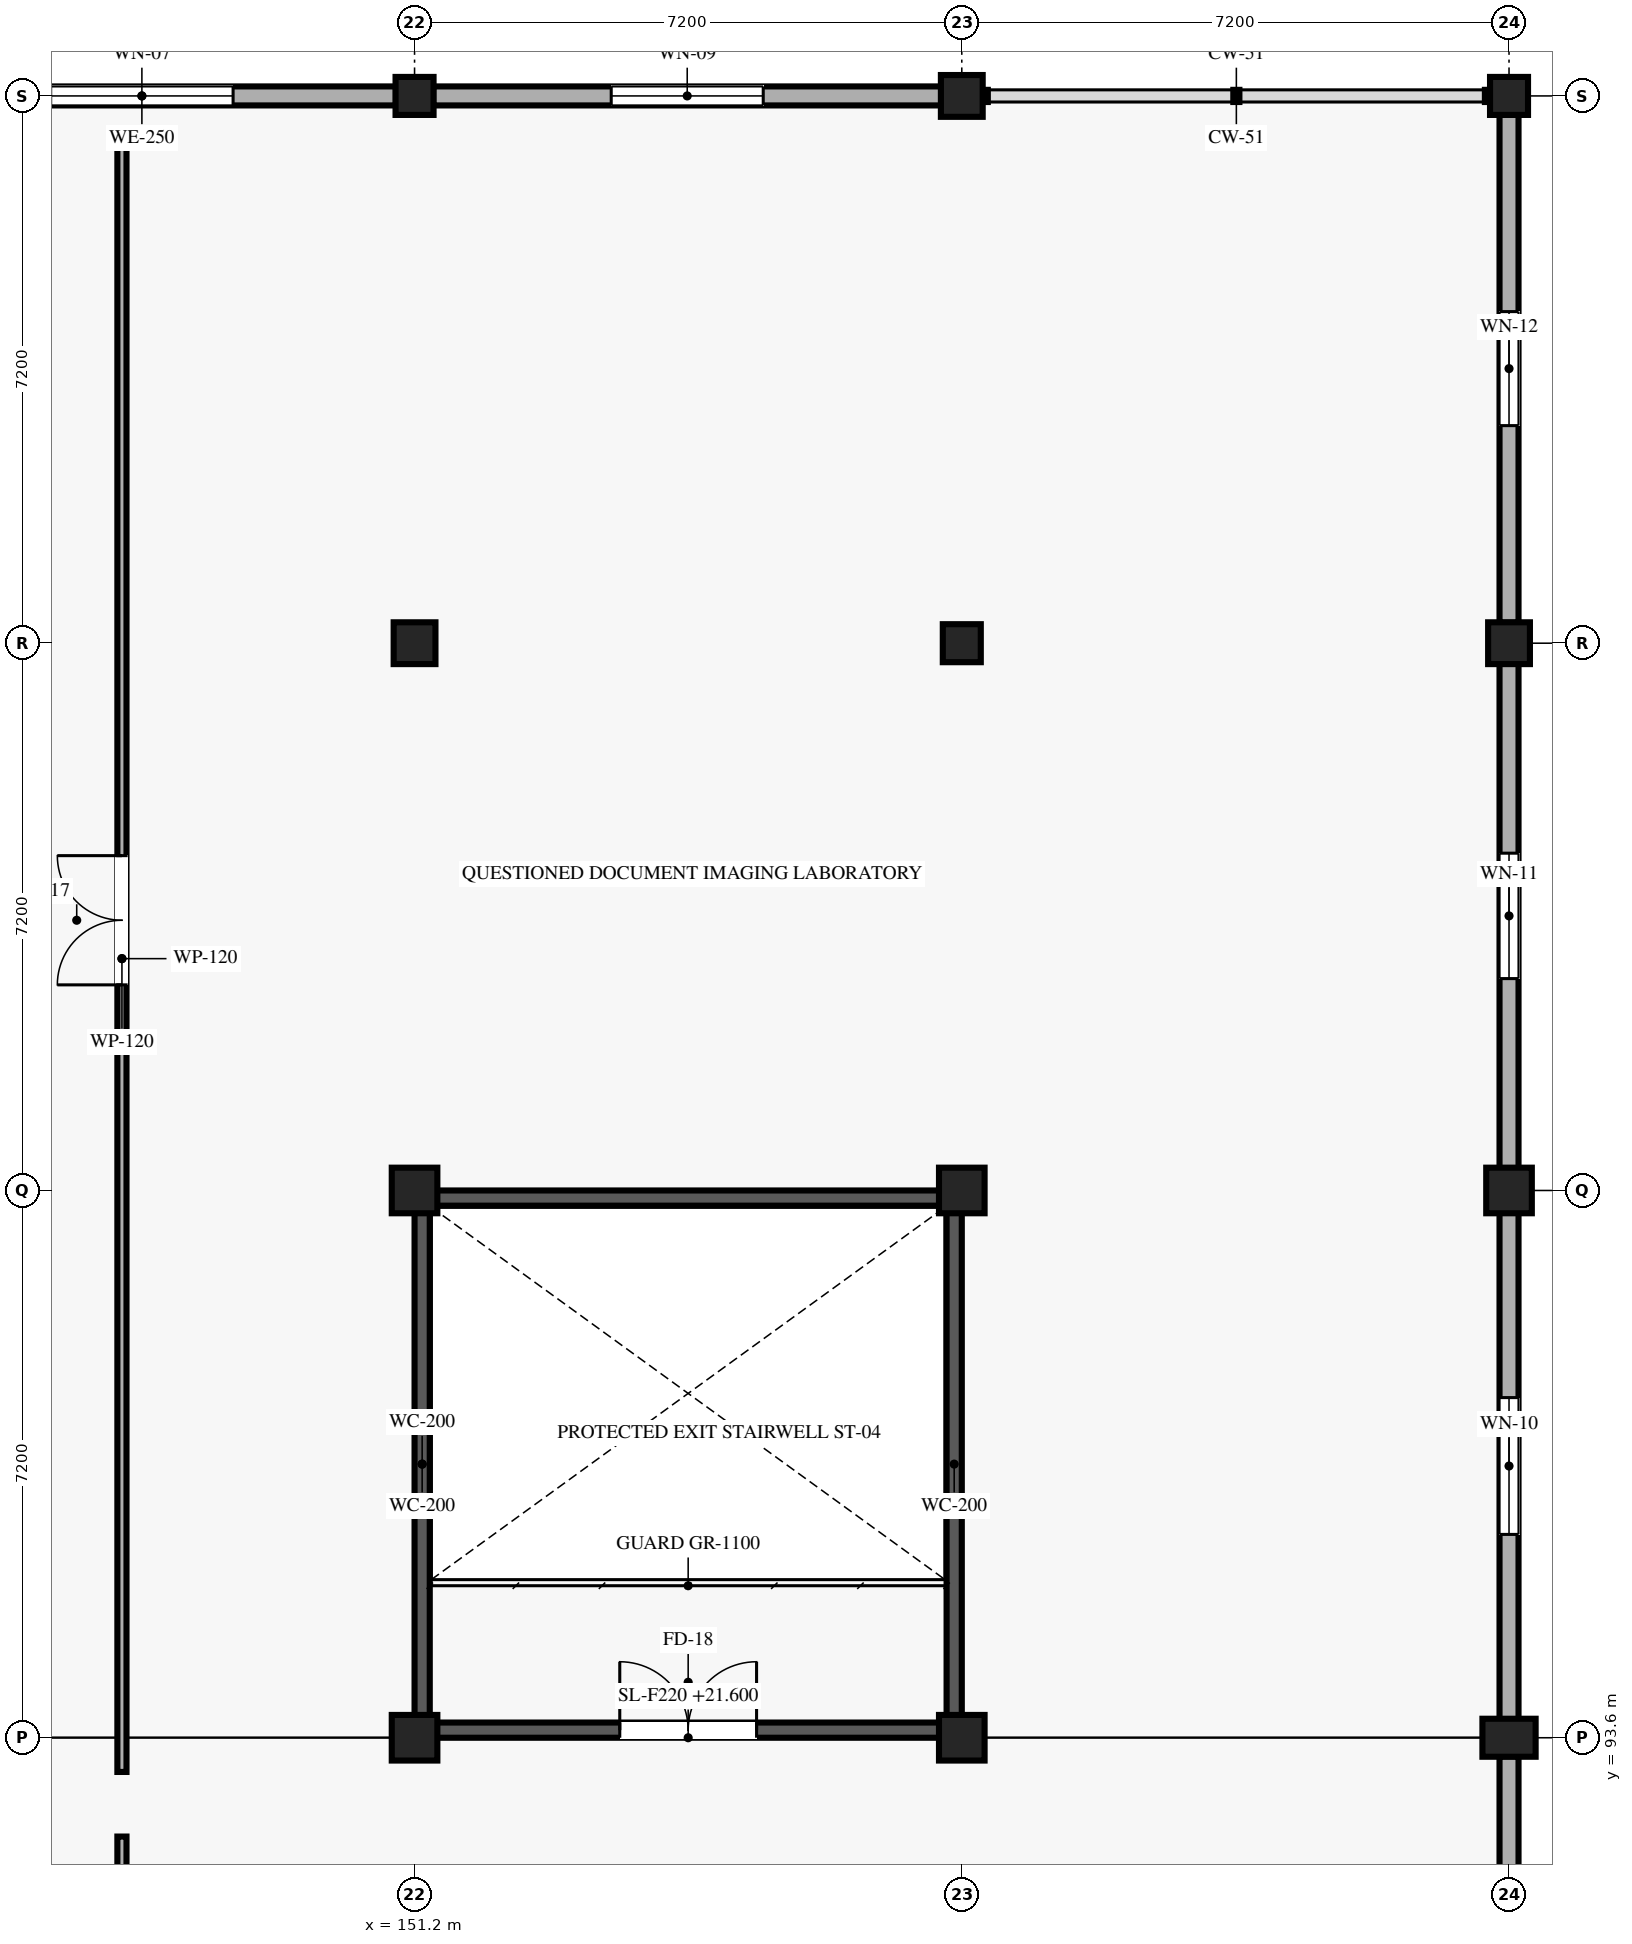
"""IFC4 building model, lengths in metres.
Left out: names, types, materials, properties, quantities, classifications, styles, units other than length and angle.
Written with IfcOpenShell. Run it as: python <this file> out.ifc"""

import sys

from ifc_helpers import new_model, si_unit, direction, frame, frame_2d, origin, origin_2d, place, context, subcontext, project, spatial, rectangle, extrude, element, fill, save


model = new_model("IFC4")
c1 = context("Model", 3, precision=1e-05, world=origin(), true_north=direction((0.0, 1.0)))
c2 = subcontext(c1, "Body", "Model", "MODEL_VIEW")
j1 = project(units=[si_unit("LENGTHUNIT", "METRE"), si_unit("PLANEANGLEUNIT", "RADIAN")], contexts=[c1])
p1 = place(None, origin())
s1 = spatial("IfcSite", under=j1, at=p1, CompositionType="ELEMENT")
p2 = place(p1, origin())
s2 = spatial("IfcBuilding", under=s1, at=p2, CompositionType="ELEMENT")
p3 = place(p2, frame((0.0, 0.0, 21.6)))
s3 = spatial("IfcBuildingStorey", under=s2, at=p3, CompositionType="ELEMENT", Elevation=21.6)
for number, where, z_axis, x_axis in (
    (1, (151.2, 93.6, 0.0), (0.0, 0.0, 1.0), (1.0, 0.0, 0.0)),
    (2, (151.2, 100.8, 0.0), (0.0, 0.0, 1.0), (1.0, 0.0, 0.0)),
):
    element("IfcColumn", number, at=place(p3, frame(where, z_axis=z_axis, x_axis=x_axis)), inside=s3, PredefinedType="COLUMN", context=c2, shape_type="SweptSolid", body=[
        extrude(rectangle(XDim=0.6, YDim=0.6, at=origin_2d()), origin(), (0.0, 0.0, 1.0), 4.05),
    ])
p4 = place(p3, frame((151.2, 108.0, 0.0), z_axis=(0.0, 0.0, 1.0), x_axis=(1.0, 0.0, 0.0)))
e3 = element("IfcColumn", 3, at=p4, inside=s3, PredefinedType="COLUMN", context=c2, shape_type="SweptSolid", body=[
    extrude(rectangle(XDim=0.55, YDim=0.55, at=origin_2d()), origin(), (0.0, 0.0, 1.0), 4.05),
])
p5 = place(p3, frame((151.2, 115.2, 0.0), z_axis=(0.0, 0.0, 1.0), x_axis=(1.0, 0.0, 0.0)))
e4 = element("IfcColumn", 4, at=p5, inside=s3, PredefinedType="COLUMN", context=c2, shape_type="SweptSolid", body=[
    extrude(rectangle(XDim=0.5, YDim=0.5, at=origin_2d()), origin(), (0.0, 0.0, 1.0), 4.05),
])
for number, where, z_axis, x_axis in (
    (5, (158.4, 93.6, 0.0), (0.0, 0.0, 1.0), (1.0, 0.0, 0.0)),
    (6, (158.4, 100.8, 0.0), (0.0, 0.0, 1.0), (1.0, 0.0, 0.0)),
):
    element("IfcColumn", number, at=place(p3, frame(where, z_axis=z_axis, x_axis=x_axis)), inside=s3, PredefinedType="COLUMN", context=c2, shape_type="SweptSolid", body=[
        extrude(rectangle(XDim=0.6, YDim=0.6, at=origin_2d()), origin(), (0.0, 0.0, 1.0), 4.05),
    ])
p6 = place(p3, frame((158.4, 108.0, 0.0), z_axis=(0.0, 0.0, 1.0), x_axis=(1.0, 0.0, 0.0)))
e7 = element("IfcColumn", 7, at=p6, inside=s3, PredefinedType="COLUMN", context=c2, shape_type="SweptSolid", body=[
    extrude(rectangle(XDim=0.5, YDim=0.5, at=origin_2d()), origin(), (0.0, 0.0, 1.0), 4.05),
])
p7 = place(p3, frame((158.4, 115.2, 0.0), z_axis=(0.0, 0.0, 1.0), x_axis=(1.0, 0.0, 0.0)))
e8 = element("IfcColumn", 8, at=p7, inside=s3, PredefinedType="COLUMN", context=c2, shape_type="SweptSolid", body=[
    extrude(rectangle(XDim=0.55, YDim=0.55, at=origin_2d()), origin(), (0.0, 0.0, 1.0), 4.05),
])
p8 = place(p3, frame((165.6, 93.6, 0.0), z_axis=(0.0, 0.0, 1.0), x_axis=(0.0, 1.0, 0.0)))
e9 = element("IfcColumn", 9, at=p8, inside=s3, PredefinedType="COLUMN", context=c2, shape_type="SweptSolid", body=[
    extrude(rectangle(XDim=0.5, YDim=0.7, at=origin_2d()), origin(), (0.0, 0.0, 1.0), 4.05),
])
p9 = place(p3, frame((165.6, 100.8, 0.0), z_axis=(0.0, 0.0, 1.0), x_axis=(1.0, 0.0, 0.0)))
e10 = element("IfcColumn", 10, at=p9, inside=s3, PredefinedType="COLUMN", context=c2, shape_type="SweptSolid", body=[
    extrude(rectangle(XDim=0.6, YDim=0.6, at=origin_2d()), origin(), (0.0, 0.0, 1.0), 4.05),
])
p10 = place(p3, frame((165.6, 108.0, 0.0), z_axis=(0.0, 0.0, 1.0), x_axis=(1.0, 0.0, 0.0)))
e11 = element("IfcColumn", 11, at=p10, inside=s3, PredefinedType="COLUMN", context=c2, shape_type="SweptSolid", body=[
    extrude(rectangle(XDim=0.55, YDim=0.55, at=origin_2d()), origin(), (0.0, 0.0, 1.0), 4.05),
])
p11 = place(p3, frame((165.6, 115.2, 0.0), z_axis=(0.0, 0.0, 1.0), x_axis=(1.0, 0.0, 0.0)))
e12 = element("IfcColumn", 12, at=p11, inside=s3, PredefinedType="COLUMN", context=c2, shape_type="SweptSolid", body=[
    extrude(rectangle(XDim=0.5, YDim=0.5, at=origin_2d()), origin(), (0.0, 0.0, 1.0), 4.05),
])
p12 = place(p3, frame((144.27, 115.2, 0.0), z_axis=(0.0, 0.0, 1.0), x_axis=(1.0, 0.0, 0.0)))
e13 = element("IfcWall", 13, at=p12, inside=s3, PredefinedType="SOLIDWALL", context=c2, shape_type="SweptSolid", body=[
    extrude(rectangle(XDim=6.685, YDim=0.25, at=frame_2d((3.343, 0.0))), origin(), (0.0, 0.0, 1.0), 3.295),
])
p13 = place(p12, frame((2.143, 0.0, 0.85)))
e14 = element("IfcOpeningElement", 14, at=p13, cuts=e13, PredefinedType="OPENING", context=c2, shape_type="SweptSolid", body=[
    extrude(rectangle(XDim=2.4, YDim=1.75, at=frame_2d((1.2, 0.875))), frame((0.0, 0.135, 0.0), z_axis=(0.0, -1.0, 0.0), x_axis=(1.0, 0.0, 0.0)), (0.0, 0.0, 1.0), 0.27),
])
p14 = place(p3, frame((151.445, 115.2, 0.0), z_axis=(0.0, 0.0, 1.0), x_axis=(1.0, 0.0, 0.0)))
e15 = element("IfcWall", 15, at=p14, inside=s3, PredefinedType="SOLIDWALL", context=c2, shape_type="SweptSolid", body=[
    extrude(rectangle(XDim=6.685, YDim=0.25, at=frame_2d((3.342, 0.0))), origin(), (0.0, 0.0, 1.0), 3.295),
])
p15 = place(p14, frame((2.343, 0.0, 0.85)))
e16 = element("IfcOpeningElement", 16, at=p15, cuts=e15, PredefinedType="OPENING", context=c2, shape_type="SweptSolid", body=[
    extrude(rectangle(XDim=2.0, YDim=1.65, at=frame_2d((1.0, 0.825))), frame((0.0, 0.135, 0.0), z_axis=(0.0, -1.0, 0.0), x_axis=(1.0, 0.0, 0.0)), (0.0, 0.0, 1.0), 0.27),
])
p16 = place(p3, frame((165.6, 86.645, 0.0), z_axis=(0.0, 0.0, 1.0), x_axis=(0.0, 1.0, 0.0)))
e17 = element("IfcWall", 17, at=p16, inside=s3, PredefinedType="SOLIDWALL", context=c2, shape_type="SweptSolid", body=[
    extrude(rectangle(XDim=6.71, YDim=0.25, at=frame_2d((3.355, 0.0))), origin(), (0.0, 0.0, 1.0), 3.295),
])
p17 = place(p16, frame((2.355, 0.0, 0.85)))
e18 = element("IfcOpeningElement", 18, at=p17, cuts=e17, PredefinedType="OPENING", context=c2, shape_type="SweptSolid", body=[
    extrude(rectangle(XDim=2.0, YDim=1.65, at=frame_2d((1.0, 0.825))), frame((0.0, 0.135, 0.0), z_axis=(0.0, -1.0, 0.0), x_axis=(1.0, 0.0, 0.0)), (0.0, 0.0, 1.0), 0.27),
])
p18 = place(p3, frame((165.6, 93.845, 0.0), z_axis=(0.0, 0.0, 1.0), x_axis=(0.0, 1.0, 0.0)))
e19 = element("IfcWall", 19, at=p18, inside=s3, PredefinedType="SOLIDWALL", context=c2, shape_type="SweptSolid", body=[
    extrude(rectangle(XDim=6.66, YDim=0.25, at=frame_2d((3.33, 0.0))), origin(), (0.0, 0.0, 1.0), 3.295),
])
p19 = place(p18, frame((2.43, 0.0, 0.85)))
e20 = element("IfcOpeningElement", 20, at=p19, cuts=e19, PredefinedType="OPENING", context=c2, shape_type="SweptSolid", body=[
    extrude(rectangle(XDim=1.8, YDim=1.6, at=frame_2d((0.9, 0.8))), frame((0.0, 0.135, 0.0), z_axis=(0.0, -1.0, 0.0), x_axis=(1.0, 0.0, 0.0)), (0.0, 0.0, 1.0), 0.27),
])
p20 = place(p3, frame((165.6, 101.095, 0.0), z_axis=(0.0, 0.0, 1.0), x_axis=(0.0, 1.0, 0.0)))
e21 = element("IfcWall", 21, at=p20, inside=s3, PredefinedType="SOLIDWALL", context=c2, shape_type="SweptSolid", body=[
    extrude(rectangle(XDim=6.635, YDim=0.25, at=frame_2d((3.317, 0.0))), origin(), (0.0, 0.0, 1.0), 3.295),
])
p21 = place(p20, frame((2.492, 0.0, 0.85)))
e22 = element("IfcOpeningElement", 22, at=p21, cuts=e21, PredefinedType="OPENING", context=c2, shape_type="SweptSolid", body=[
    extrude(rectangle(XDim=1.65, YDim=1.55, at=frame_2d((0.825, 0.775))), frame((0.0, 0.135, 0.0), z_axis=(0.0, -1.0, 0.0), x_axis=(1.0, 0.0, 0.0)), (0.0, 0.0, 1.0), 0.27),
])
p22 = place(p3, frame((165.6, 108.27, 0.0), z_axis=(0.0, 0.0, 1.0), x_axis=(0.0, 1.0, 0.0)))
e23 = element("IfcWall", 23, at=p22, inside=s3, PredefinedType="SOLIDWALL", context=c2, shape_type="SweptSolid", body=[
    extrude(rectangle(XDim=6.685, YDim=0.25, at=frame_2d((3.343, 0.0))), origin(), (0.0, 0.0, 1.0), 3.295),
])
p23 = place(p22, frame((2.593, 0.0, 0.85)))
e24 = element("IfcOpeningElement", 24, at=p23, cuts=e23, PredefinedType="OPENING", context=c2, shape_type="SweptSolid", body=[
    extrude(rectangle(XDim=1.5, YDim=2.05, at=frame_2d((0.75, 1.025))), frame((0.0, 0.135, 0.0), z_axis=(0.0, -1.0, 0.0), x_axis=(1.0, 0.0, 0.0)), (0.0, 0.0, 1.0), 0.27),
])
p24 = place(p3, frame((151.4, 93.7, 0.0), z_axis=(0.0, 0.0, 1.0), x_axis=(1.0, 0.0, 0.0)))
e25 = element("IfcWall", 25, at=p24, inside=s3, PredefinedType="SHEAR", context=c2, shape_type="SweptSolid", body=[
    extrude(rectangle(XDim=6.8, YDim=0.2, at=frame_2d((3.4, 0.0))), origin(), (0.0, 0.0, 1.0), 3.83),
])
p25 = place(p24, frame((2.5, 0.0, 0.0)))
e26 = element("IfcOpeningElement", 26, at=p25, cuts=e25, PredefinedType="OPENING", context=c2, shape_type="SweptSolid", body=[
    extrude(rectangle(XDim=1.8, YDim=2.2, at=frame_2d((0.9, 1.1))), frame((0.0, 0.11, 0.0), z_axis=(0.0, -1.0, 0.0), x_axis=(1.0, 0.0, 0.0)), (0.0, 0.0, 1.0), 0.22),
])
for number, where, z_axis, x_axis in (
    (27, (151.4, 100.7, 0.0), (0.0, 0.0, 1.0), (1.0, 0.0, 0.0)),
    (28, (151.3, 93.8, 0.0), (0.0, 0.0, 1.0), (0.0, 1.0, 0.0)),
    (29, (158.3, 93.8, 0.0), (0.0, 0.0, 1.0), (0.0, 1.0, 0.0)),
):
    element("IfcWall", number, at=place(p3, frame(where, z_axis=z_axis, x_axis=x_axis)), inside=s3, PredefinedType="SHEAR", context=c2, shape_type="SweptSolid", body=[
        extrude(rectangle(XDim=6.8, YDim=0.2, at=frame_2d((3.4, 0.0))), origin(), (0.0, 0.0, 1.0), 3.83),
    ])
p26 = place(p3, frame((147.35, 93.15, 0.0), z_axis=(0.0, 0.0, 1.0), x_axis=(0.0, 1.0, 0.0)))
e30 = element("IfcWall", 30, at=p26, inside=s3, PredefinedType="PARTITIONING", context=c2, shape_type="SweptSolid", body=[
    extrude(rectangle(XDim=21.4, YDim=0.12, at=frame_2d((10.7, 0.0))), origin(), (0.0, 0.0, 1.0), 3.83),
])
p27 = place(p26, frame((10.355, 0.0, 0.0)))
e31 = element("IfcOpeningElement", 31, at=p27, cuts=e30, PredefinedType="OPENING", context=c2, shape_type="SweptSolid", body=[
    extrude(rectangle(XDim=1.7, YDim=2.2, at=frame_2d((0.85, 1.1))), frame((0.0, 0.07, 0.0), z_axis=(0.0, -1.0, 0.0), x_axis=(1.0, 0.0, 0.0)), (0.0, 0.0, 1.0), 0.14),
])
p28 = place(p3, frame((147.35, 75.43, 0.0), z_axis=(0.0, 0.0, 1.0), x_axis=(0.0, 1.0, 0.0)))
e32 = element("IfcWall", 32, at=p28, inside=s3, PredefinedType="PARTITIONING", context=c2, shape_type="SweptSolid", body=[
    extrude(rectangle(XDim=16.87, YDim=0.12, at=frame_2d((8.435, 0.0))), origin(), (0.0, 0.0, 1.0), 3.83),
])
p29 = place(p28, frame((6.573, 0.0, 0.0)))
e33 = element("IfcOpeningElement", 33, at=p29, cuts=e32, PredefinedType="OPENING", context=c2, shape_type="SweptSolid", body=[
    extrude(rectangle(XDim=1.7, YDim=2.2, at=frame_2d((0.85, 1.1))), frame((0.0, 0.07, 0.0), z_axis=(0.0, -1.0, 0.0), x_axis=(1.0, 0.0, 0.0)), (0.0, 0.0, 1.0), 0.14),
])
p30 = place(p13, origin())
e34 = element("IfcWindow", 34, at=p30, inside=s3, PartitioningType="SINGLE_PANEL", PredefinedType="WINDOW", context=c2, shape_type="SweptSolid", body=[
    extrude(rectangle(XDim=2.4, YDim=1.75, at=frame_2d((1.2, 0.875))), frame((0.0, 0.03, 0.0), z_axis=(0.0, -1.0, 0.0), x_axis=(1.0, 0.0, 0.0)), (0.0, 0.0, 1.0), 0.06),
])
fill(e14, e34)
p31 = place(p15, origin())
e35 = element("IfcWindow", 35, at=p31, inside=s3, PartitioningType="SINGLE_PANEL", PredefinedType="WINDOW", context=c2, shape_type="SweptSolid", body=[
    extrude(rectangle(XDim=2.0, YDim=1.65, at=frame_2d((1.0, 0.825))), frame((0.0, 0.03, 0.0), z_axis=(0.0, -1.0, 0.0), x_axis=(1.0, 0.0, 0.0)), (0.0, 0.0, 1.0), 0.06),
])
fill(e16, e35)
p32 = place(p19, origin())
e36 = element("IfcWindow", 36, at=p32, inside=s3, PartitioningType="SINGLE_PANEL", PredefinedType="WINDOW", context=c2, shape_type="SweptSolid", body=[
    extrude(rectangle(XDim=1.8, YDim=1.6, at=frame_2d((0.9, 0.8))), frame((0.0, 0.03, 0.0), z_axis=(0.0, -1.0, 0.0), x_axis=(1.0, 0.0, 0.0)), (0.0, 0.0, 1.0), 0.06),
])
fill(e20, e36)
p33 = place(p21, origin())
e37 = element("IfcWindow", 37, at=p33, inside=s3, PartitioningType="SINGLE_PANEL", PredefinedType="WINDOW", context=c2, shape_type="SweptSolid", body=[
    extrude(rectangle(XDim=1.65, YDim=1.55, at=frame_2d((0.825, 0.775))), frame((0.0, 0.03, 0.0), z_axis=(0.0, -1.0, 0.0), x_axis=(1.0, 0.0, 0.0)), (0.0, 0.0, 1.0), 0.06),
])
fill(e22, e37)
p34 = place(p23, origin())
e38 = element("IfcWindow", 38, at=p34, inside=s3, PartitioningType="SINGLE_PANEL", PredefinedType="WINDOW", context=c2, shape_type="SweptSolid", body=[
    extrude(rectangle(XDim=1.5, YDim=2.05, at=frame_2d((0.75, 1.025))), frame((0.0, 0.03, 0.0), z_axis=(0.0, -1.0, 0.0), x_axis=(1.0, 0.0, 0.0)), (0.0, 0.0, 1.0), 0.06),
])
fill(e24, e38)
p35 = place(p25, origin())
e39 = element("IfcDoor", 39, at=p35, inside=s3, OperationType="DOUBLE_DOOR_SINGLE_SWING", PredefinedType="DOOR", context=c2, shape_type="SweptSolid", body=[
    extrude(rectangle(XDim=1.8, YDim=2.2, at=frame_2d((0.9, 1.1))), frame((0.0, 0.025, 0.0), z_axis=(0.0, -1.0, 0.0), x_axis=(1.0, 0.0, 0.0)), (0.0, 0.0, 1.0), 0.05),
])
fill(e26, e39)
p36 = place(p27, origin())
e40 = element("IfcDoor", 40, at=p36, inside=s3, OperationType="DOUBLE_DOOR_SINGLE_SWING", PredefinedType="DOOR", context=c2, shape_type="SweptSolid", body=[
    extrude(rectangle(XDim=1.7, YDim=2.2, at=frame_2d((0.85, 1.1))), frame((0.0, 0.025, 0.0), z_axis=(0.0, -1.0, 0.0), x_axis=(1.0, 0.0, 0.0)), (0.0, 0.0, 1.0), 0.05),
])
fill(e31, e40)
save(model, sys.argv[1])
